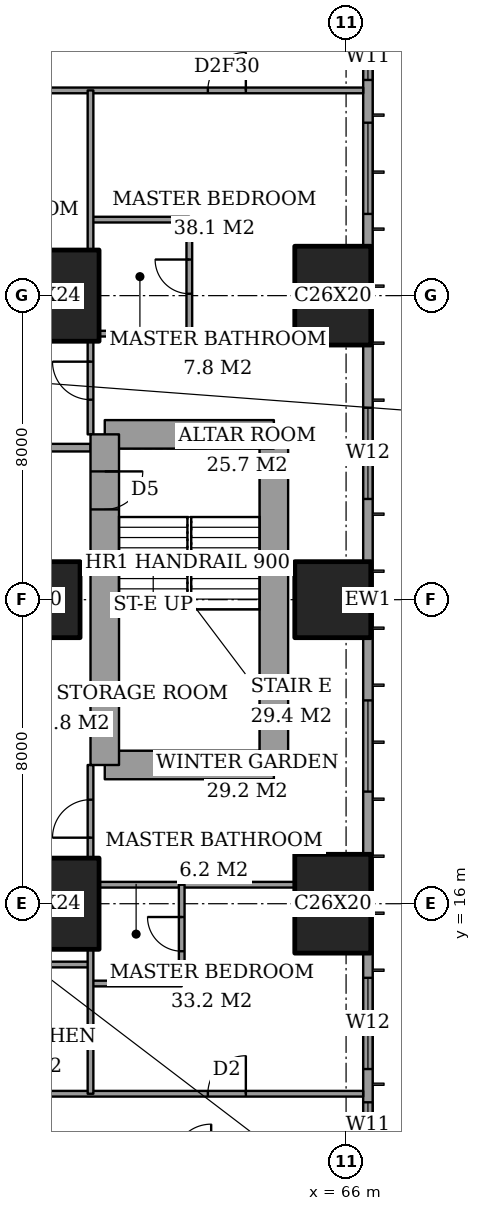
"""IFC4 building model, lengths in metres.
Left out: names, types, materials, properties, quantities, classifications, styles, units other than length and angle.
Written with IfcOpenShell. Run it as: python <this file> out.ifc"""

import sys

from ifc_helpers import new_model, si_unit, direction, frame, frame_2d, origin, origin_2d, place, context, subcontext, project, spatial, rectangle, extrude, element, fill, save


model = new_model("IFC4")
c1 = context("Model", 3, precision=1e-05, world=origin(), true_north=direction((0.0, 1.0)))
c2 = subcontext(c1, "Body", "Model", "MODEL_VIEW")
j1 = project(units=[si_unit("LENGTHUNIT", "METRE"), si_unit("PLANEANGLEUNIT", "RADIAN")], contexts=[c1])
p1 = place(None, origin())
s1 = spatial("IfcSite", under=j1, at=p1, CompositionType="ELEMENT")
p2 = place(p1, origin())
s2 = spatial("IfcBuilding", under=s1, at=p2, CompositionType="ELEMENT")
p3 = place(p2, frame((0.0, 0.0, 117.8)))
s3 = spatial("IfcBuildingStorey", under=s2, at=p3, CompositionType="ELEMENT", Elevation=117.8)
p4 = place(p3, frame((58.0, 16.0, 0.0), z_axis=(0.0, 0.0, 1.0), x_axis=(1.0, 0.0, 0.0)))
e1 = element("IfcColumn", 1, at=p4, inside=s3, PredefinedType="COLUMN", context=c2, shape_type="SweptSolid", body=[
    extrude(rectangle(XDim=3.0, YDim=2.4, at=origin_2d()), origin(), (0.0, 0.0, 1.0), 3.6),
])
p5 = place(p3, frame((58.0, 24.0, 0.0), z_axis=(0.0, 0.0, 1.0), x_axis=(1.0, 0.0, 0.0)))
e2 = element("IfcColumn", 2, at=p5, inside=s3, PredefinedType="COLUMN", context=c2, shape_type="SweptSolid", body=[
    extrude(rectangle(XDim=2.0, YDim=2.0, at=origin_2d()), origin(), (0.0, 0.0, 1.0), 3.6),
])
p6 = place(p3, frame((58.0, 32.0, 0.0), z_axis=(0.0, 0.0, 1.0), x_axis=(1.0, 0.0, 0.0)))
e3 = element("IfcColumn", 3, at=p6, inside=s3, PredefinedType="COLUMN", context=c2, shape_type="SweptSolid", body=[
    extrude(rectangle(XDim=3.0, YDim=2.4, at=origin_2d()), origin(), (0.0, 0.0, 1.0), 3.6),
])
p7 = place(p3, frame((65.65, 16.0, 0.0), z_axis=(0.0, 0.0, 1.0), x_axis=(0.0, 1.0, 0.0)))
e4 = element("IfcColumn", 4, at=p7, inside=s3, PredefinedType="COLUMN", context=c2, shape_type="SweptSolid", body=[
    extrude(rectangle(XDim=2.6, YDim=2.0, at=origin_2d()), origin(), (0.0, 0.0, 1.0), 3.6),
])
p8 = place(p3, frame((65.65, 24.0, 0.0), z_axis=(0.0, 0.0, 1.0), x_axis=(1.0, 0.0, 0.0)))
e5 = element("IfcColumn", 5, at=p8, inside=s3, PredefinedType="COLUMN", context=c2, shape_type="SweptSolid", body=[
    extrude(rectangle(XDim=2.0, YDim=2.0, at=origin_2d()), origin(), (0.0, 0.0, 1.0), 3.6),
])
p9 = place(p3, frame((65.65, 32.0, 0.0), z_axis=(0.0, 0.0, 1.0), x_axis=(0.0, 1.0, 0.0)))
e6 = element("IfcColumn", 6, at=p9, inside=s3, PredefinedType="COLUMN", context=c2, shape_type="SweptSolid", body=[
    extrude(rectangle(XDim=2.6, YDim=2.0, at=origin_2d()), origin(), (0.0, 0.0, 1.0), 3.6),
])
p10 = place(p3, frame((59.65, 19.65, 0.0), z_axis=(0.0, 0.0, 1.0), x_axis=(1.0, 0.0, 0.0)))
e7 = element("IfcWall", 7, at=p10, inside=s3, PredefinedType="SHEAR", context=c2, shape_type="SweptSolid", body=[
    extrude(rectangle(XDim=4.45, YDim=0.75, at=frame_2d((2.225, 0.0))), origin(), (0.0, 0.0, 1.0), 3.6),
])
p11 = place(p3, frame((64.1, 19.65, 0.0), z_axis=(0.0, 0.0, 1.0), x_axis=(0.0, 1.0, 0.0)))
e8 = element("IfcWall", 8, at=p11, inside=s3, PredefinedType="SHEAR", context=c2, shape_type="SweptSolid", body=[
    extrude(rectangle(XDim=8.7, YDim=0.75, at=frame_2d((4.35, 0.0))), origin(), (0.0, 0.0, 1.0), 3.6),
])
p12 = place(p3, frame((64.1, 28.35, 0.0), z_axis=(0.0, 0.0, 1.0), x_axis=(-1.0, 0.0, 0.0)))
e9 = element("IfcWall", 9, at=p12, inside=s3, PredefinedType="SHEAR", context=c2, shape_type="SweptSolid", body=[
    extrude(rectangle(XDim=4.45, YDim=0.75, at=frame_2d((2.225, 0.0))), origin(), (0.0, 0.0, 1.0), 3.6),
])
p13 = place(p3, frame((59.65, 28.35, 0.0), z_axis=(0.0, 0.0, 1.0), x_axis=(0.0, -1.0, 0.0)))
e10 = element("IfcWall", 10, at=p13, inside=s3, PredefinedType="SHEAR", context=c2, shape_type="SweptSolid", body=[
    extrude(rectangle(XDim=8.7, YDim=0.75, at=frame_2d((4.35, 0.0))), origin(), (0.0, 0.0, 1.0), 3.6),
])
p14 = place(p13, frame((0.975, 0.0, 0.0)))
e11 = element("IfcOpeningElement", 11, at=p14, cuts=e10, PredefinedType="OPENING", context=c2, shape_type="SweptSolid", body=[
    extrude(rectangle(XDim=1.0, YDim=2.1, at=frame_2d((0.5, 1.05))), frame((0.0, 0.385, 0.0), z_axis=(0.0, -1.0, 0.0), x_axis=(1.0, 0.0, 0.0)), (0.0, 0.0, 1.0), 0.77),
])
p15 = place(p3, frame((66.575, 3.175, 0.0), z_axis=(0.0, 0.0, 1.0), x_axis=(0.0, 1.0, 0.0)))
e12 = element("IfcWall", 12, at=p15, inside=s3, PredefinedType="SOLIDWALL", context=c2, shape_type="SweptSolid", body=[
    extrude(rectangle(XDim=41.65, YDim=0.25, at=frame_2d((20.825, 0.0))), origin(), (0.0, 0.0, 1.0), 3.6),
])
p16 = place(p15, frame((0.775, 0.0, 0.4)))
e13 = element("IfcOpeningElement", 13, at=p16, cuts=e12, PredefinedType="OPENING", context=c2, shape_type="SweptSolid", body=[
    extrude(rectangle(XDim=2.4, YDim=2.2, at=frame_2d((1.2, 1.1))), frame((0.0, 0.135, 0.0), z_axis=(0.0, -1.0, 0.0), x_axis=(1.0, 0.0, 0.0)), (0.0, 0.0, 1.0), 0.27),
])
p17 = place(p15, frame((6.4, 0.0, 0.4)))
e14 = element("IfcOpeningElement", 14, at=p17, cuts=e12, PredefinedType="OPENING", context=c2, shape_type="SweptSolid", body=[
    extrude(rectangle(XDim=1.2, YDim=2.2, at=frame_2d((0.6, 1.1))), frame((0.0, 0.135, 0.0), z_axis=(0.0, -1.0, 0.0), x_axis=(1.0, 0.0, 0.0)), (0.0, 0.0, 1.0), 0.27),
])
p18 = place(p15, frame((8.475, 0.0, 0.4)))
e15 = element("IfcOpeningElement", 15, at=p18, cuts=e12, PredefinedType="OPENING", context=c2, shape_type="SweptSolid", body=[
    extrude(rectangle(XDim=2.4, YDim=2.2, at=frame_2d((1.2, 1.1))), frame((0.0, 0.135, 0.0), z_axis=(0.0, -1.0, 0.0), x_axis=(1.0, 0.0, 0.0)), (0.0, 0.0, 1.0), 0.27),
])
p19 = place(p15, frame((15.775, 0.0, 0.4)))
e16 = element("IfcOpeningElement", 16, at=p19, cuts=e12, PredefinedType="OPENING", context=c2, shape_type="SweptSolid", body=[
    extrude(rectangle(XDim=2.4, YDim=2.2, at=frame_2d((1.2, 1.1))), frame((0.0, 0.135, 0.0), z_axis=(0.0, -1.0, 0.0), x_axis=(1.0, 0.0, 0.0)), (0.0, 0.0, 1.0), 0.27),
])
p20 = place(p15, frame((23.475, 0.0, 0.4)))
e17 = element("IfcOpeningElement", 17, at=p20, cuts=e12, PredefinedType="OPENING", context=c2, shape_type="SweptSolid", body=[
    extrude(rectangle(XDim=2.4, YDim=2.2, at=frame_2d((1.2, 1.1))), frame((0.0, 0.135, 0.0), z_axis=(0.0, -1.0, 0.0), x_axis=(1.0, 0.0, 0.0)), (0.0, 0.0, 1.0), 0.27),
])
p21 = place(p15, frame((30.975, 0.0, 0.4)))
e18 = element("IfcOpeningElement", 18, at=p21, cuts=e12, PredefinedType="OPENING", context=c2, shape_type="SweptSolid", body=[
    extrude(rectangle(XDim=2.4, YDim=2.2, at=frame_2d((1.2, 1.1))), frame((0.0, 0.135, 0.0), z_axis=(0.0, -1.0, 0.0), x_axis=(1.0, 0.0, 0.0)), (0.0, 0.0, 1.0), 0.27),
])
p22 = place(p15, frame((34.5, 0.0, 0.4)))
e19 = element("IfcOpeningElement", 19, at=p22, cuts=e12, PredefinedType="OPENING", context=c2, shape_type="SweptSolid", body=[
    extrude(rectangle(XDim=1.2, YDim=2.2, at=frame_2d((0.6, 1.1))), frame((0.0, 0.135, 0.0), z_axis=(0.0, -1.0, 0.0), x_axis=(1.0, 0.0, 0.0)), (0.0, 0.0, 1.0), 0.27),
])
p23 = place(p15, frame((38.475, 0.0, 0.4)))
e20 = element("IfcOpeningElement", 20, at=p23, cuts=e12, PredefinedType="OPENING", context=c2, shape_type="SweptSolid", body=[
    extrude(rectangle(XDim=2.4, YDim=2.2, at=frame_2d((1.2, 1.1))), frame((0.0, 0.135, 0.0), z_axis=(0.0, -1.0, 0.0), x_axis=(1.0, 0.0, 0.0)), (0.0, 0.0, 1.0), 0.27),
])
p24 = place(p3, frame((41.439, 11.0, 0.0), z_axis=(0.0, 0.0, 1.0), x_axis=(1.0, 0.0, 0.0)))
e21 = element("IfcWall", 21, at=p24, inside=s3, PredefinedType="PARTITIONING", context=c2, shape_type="SweptSolid", body=[
    extrude(rectangle(XDim=25.011, YDim=0.15, at=frame_2d((12.505, 0.0))), origin(), (0.0, 0.0, 1.0), 3.35),
])
p25 = place(p24, frame((12.561, 0.0, 0.0)))
e22 = element("IfcOpeningElement", 22, at=p25, cuts=e21, PredefinedType="OPENING", context=c2, shape_type="SweptSolid", body=[
    extrude(rectangle(XDim=1.0, YDim=2.1, at=frame_2d((0.5, 1.05))), frame((0.0, 0.085, 0.0), z_axis=(0.0, -1.0, 0.0), x_axis=(1.0, 0.0, 0.0)), (0.0, 0.0, 1.0), 0.17),
])
p26 = place(p24, frame((20.924, 0.0, 0.0)))
e23 = element("IfcOpeningElement", 23, at=p26, cuts=e21, PredefinedType="OPENING", context=c2, shape_type="SweptSolid", body=[
    extrude(rectangle(XDim=1.0, YDim=2.1, at=frame_2d((0.5, 1.05))), frame((0.0, 0.085, 0.0), z_axis=(0.0, -1.0, 0.0), x_axis=(1.0, 0.0, 0.0)), (0.0, 0.0, 1.0), 0.17),
])
p27 = place(p24, frame((15.499, 0.0, 0.0)))
e24 = element("IfcOpeningElement", 24, at=p27, cuts=e21, PredefinedType="OPENING", context=c2, shape_type="SweptSolid", body=[
    extrude(rectangle(XDim=1.0, YDim=2.1, at=frame_2d((0.5, 1.05))), frame((0.0, 0.085, 0.0), z_axis=(0.0, -1.0, 0.0), x_axis=(1.0, 0.0, 0.0)), (0.0, 0.0, 1.0), 0.17),
])
p28 = place(p24, frame((8.761, 0.0, 0.0)))
e25 = element("IfcOpeningElement", 25, at=p28, cuts=e21, PredefinedType="OPENING", context=c2, shape_type="SweptSolid", body=[
    extrude(rectangle(XDim=1.0, YDim=2.1, at=frame_2d((0.5, 1.05))), frame((0.0, 0.085, 0.0), z_axis=(0.0, -1.0, 0.0), x_axis=(1.0, 0.0, 0.0)), (0.0, 0.0, 1.0), 0.17),
])
p29 = place(p24, frame((2.836, 0.0, 0.0)))
e26 = element("IfcOpeningElement", 26, at=p29, cuts=e21, PredefinedType="OPENING", context=c2, shape_type="SweptSolid", body=[
    extrude(rectangle(XDim=1.0, YDim=2.1, at=frame_2d((0.5, 1.05))), frame((0.0, 0.085, 0.0), z_axis=(0.0, -1.0, 0.0), x_axis=(1.0, 0.0, 0.0)), (0.0, 0.0, 1.0), 0.17),
])
p30 = place(p3, frame((59.275, 13.9, 0.0), z_axis=(0.0, 0.0, 1.0), x_axis=(1.0, 0.0, 0.0)))
e27 = element("IfcWall", 27, at=p30, inside=s3, PredefinedType="PARTITIONING", context=c2, shape_type="SweptSolid", body=[
    extrude(rectangle(XDim=2.4, YDim=0.15, at=frame_2d((1.2, 0.0))), origin(), (0.0, 0.0, 1.0), 3.35),
])
p31 = place(p3, frame((55.6, 14.4, 0.0), z_axis=(0.0, 0.0, 1.0), x_axis=(1.0, 0.0, 0.0)))
e28 = element("IfcWall", 28, at=p31, inside=s3, PredefinedType="PARTITIONING", context=c2, shape_type="SweptSolid", body=[
    extrude(rectangle(XDim=3.675, YDim=0.15, at=frame_2d((1.837, 0.0))), origin(), (0.0, 0.0, 1.0), 3.35),
])
p32 = place(p3, frame((59.5, 16.5, 0.0), z_axis=(0.0, 0.0, 1.0), x_axis=(1.0, 0.0, 0.0)))
e29 = element("IfcWall", 29, at=p32, inside=s3, PredefinedType="PARTITIONING", context=c2, shape_type="SweptSolid", body=[
    extrude(rectangle(XDim=5.15, YDim=0.15, at=frame_2d((2.575, 0.0))), origin(), (0.0, 0.0, 1.0), 3.35),
])
p33 = place(p3, frame((42.0, 28.0, 0.0), z_axis=(0.0, 0.0, 1.0), x_axis=(1.0, 0.0, 0.0)))
e30 = element("IfcWall", 30, at=p33, inside=s3, PredefinedType="PARTITIONING", context=c2, shape_type="SweptSolid", body=[
    extrude(rectangle(XDim=17.275, YDim=0.2, at=frame_2d((8.637, 0.0))), origin(), (0.0, 0.0, 1.0), 3.35),
])
p34 = place(p33, frame((8.9, 0.0, 0.0)))
e31 = element("IfcOpeningElement", 31, at=p34, cuts=e30, PredefinedType="OPENING", context=c2, shape_type="SweptSolid", body=[
    extrude(rectangle(XDim=1.2, YDim=2.4, at=frame_2d((0.6, 1.2))), frame((0.0, 0.11, 0.0), z_axis=(0.0, -1.0, 0.0), x_axis=(1.0, 0.0, 0.0)), (0.0, 0.0, 1.0), 0.22),
])
p35 = place(p3, frame((59.5, 31.0, 0.0), z_axis=(0.0, 0.0, 1.0), x_axis=(1.0, 0.0, 0.0)))
e32 = element("IfcWall", 32, at=p35, inside=s3, PredefinedType="PARTITIONING", context=c2, shape_type="SweptSolid", body=[
    extrude(rectangle(XDim=5.15, YDim=0.15, at=frame_2d((2.575, 0.0))), origin(), (0.0, 0.0, 1.0), 3.35),
])
p36 = place(p3, frame((59.275, 34.0, 0.0), z_axis=(0.0, 0.0, 1.0), x_axis=(1.0, 0.0, 0.0)))
e33 = element("IfcWall", 33, at=p36, inside=s3, PredefinedType="PARTITIONING", context=c2, shape_type="SweptSolid", body=[
    extrude(rectangle(XDim=2.6, YDim=0.15, at=frame_2d((1.3, 0.0))), origin(), (0.0, 0.0, 1.0), 3.35),
])
p37 = place(p3, frame((41.439, 37.4, 0.0), z_axis=(0.0, 0.0, 1.0), x_axis=(1.0, 0.0, 0.0)))
e34 = element("IfcWall", 34, at=p37, inside=s3, PredefinedType="PARTITIONING", context=c2, shape_type="SweptSolid", body=[
    extrude(rectangle(XDim=25.011, YDim=0.15, at=frame_2d((12.505, 0.0))), origin(), (0.0, 0.0, 1.0), 3.35),
])
p38 = place(p37, frame((11.961, 0.0, 0.0)))
e35 = element("IfcOpeningElement", 35, at=p38, cuts=e34, PredefinedType="OPENING", context=c2, shape_type="SweptSolid", body=[
    extrude(rectangle(XDim=1.0, YDim=2.1, at=frame_2d((0.5, 1.05))), frame((0.0, 0.085, 0.0), z_axis=(0.0, -1.0, 0.0), x_axis=(1.0, 0.0, 0.0)), (0.0, 0.0, 1.0), 0.17),
])
p39 = place(p37, frame((20.924, 0.0, 0.0)))
e36 = element("IfcOpeningElement", 36, at=p39, cuts=e34, PredefinedType="OPENING", context=c2, shape_type="SweptSolid", body=[
    extrude(rectangle(XDim=1.0, YDim=2.1, at=frame_2d((0.5, 1.05))), frame((0.0, 0.085, 0.0), z_axis=(0.0, -1.0, 0.0), x_axis=(1.0, 0.0, 0.0)), (0.0, 0.0, 1.0), 0.17),
])
p40 = place(p37, frame((15.249, 0.0, 0.0)))
e37 = element("IfcOpeningElement", 37, at=p40, cuts=e34, PredefinedType="OPENING", context=c2, shape_type="SweptSolid", body=[
    extrude(rectangle(XDim=0.9, YDim=2.1, at=frame_2d((0.45, 1.05))), frame((0.0, 0.085, 0.0), z_axis=(0.0, -1.0, 0.0), x_axis=(1.0, 0.0, 0.0)), (0.0, 0.0, 1.0), 0.17),
])
p41 = place(p37, frame((9.561, 0.0, 0.0)))
e38 = element("IfcOpeningElement", 38, at=p41, cuts=e34, PredefinedType="OPENING", context=c2, shape_type="SweptSolid", body=[
    extrude(rectangle(XDim=1.0, YDim=2.1, at=frame_2d((0.5, 1.05))), frame((0.0, 0.085, 0.0), z_axis=(0.0, -1.0, 0.0), x_axis=(1.0, 0.0, 0.0)), (0.0, 0.0, 1.0), 0.17),
])
p42 = place(p37, frame((7.161, 0.0, 0.0)))
e39 = element("IfcOpeningElement", 39, at=p42, cuts=e34, PredefinedType="OPENING", context=c2, shape_type="SweptSolid", body=[
    extrude(rectangle(XDim=1.0, YDim=2.1, at=frame_2d((0.5, 1.05))), frame((0.0, 0.085, 0.0), z_axis=(0.0, -1.0, 0.0), x_axis=(1.0, 0.0, 0.0)), (0.0, 0.0, 1.0), 0.17),
])
p43 = place(p37, frame((2.836, 0.0, 0.0)))
e40 = element("IfcOpeningElement", 40, at=p43, cuts=e34, PredefinedType="OPENING", context=c2, shape_type="SweptSolid", body=[
    extrude(rectangle(XDim=1.0, YDim=2.1, at=frame_2d((0.5, 1.05))), frame((0.0, 0.085, 0.0), z_axis=(0.0, -1.0, 0.0), x_axis=(1.0, 0.0, 0.0)), (0.0, 0.0, 1.0), 0.17),
])
p44 = place(p3, frame((59.275, 11.0, 0.0), z_axis=(0.0, 0.0, 1.0), x_axis=(0.0, 1.0, 0.0)))
e41 = element("IfcWall", 41, at=p44, inside=s3, PredefinedType="PARTITIONING", context=c2, shape_type="SweptSolid", body=[
    extrude(rectangle(XDim=3.8, YDim=0.15, at=frame_2d((1.9, 0.0))), origin(), (0.0, 0.0, 1.0), 3.35),
])
p45 = place(p3, frame((59.275, 17.2, 0.0), z_axis=(0.0, 0.0, 1.0), x_axis=(0.0, 1.0, 0.0)))
e42 = element("IfcWall", 42, at=p45, inside=s3, PredefinedType="PARTITIONING", context=c2, shape_type="SweptSolid", body=[
    extrude(rectangle(XDim=2.45, YDim=0.15, at=frame_2d((1.225, 0.0))), origin(), (0.0, 0.0, 1.0), 3.35),
])
p46 = place(p45, frame((0.538, 0.0, 0.0)))
e43 = element("IfcOpeningElement", 43, at=p46, cuts=e42, PredefinedType="OPENING", context=c2, shape_type="SweptSolid", body=[
    extrude(rectangle(XDim=1.0, YDim=2.1, at=frame_2d((0.5, 1.05))), frame((0.0, 0.085, 0.0), z_axis=(0.0, -1.0, 0.0), x_axis=(1.0, 0.0, 0.0)), (0.0, 0.0, 1.0), 0.17),
])
p47 = place(p3, frame((59.275, 28.35, 0.0), z_axis=(0.0, 0.0, 1.0), x_axis=(0.0, 1.0, 0.0)))
e44 = element("IfcWall", 44, at=p47, inside=s3, PredefinedType="PARTITIONING", context=c2, shape_type="SweptSolid", body=[
    extrude(rectangle(XDim=2.45, YDim=0.15, at=frame_2d((1.225, 0.0))), origin(), (0.0, 0.0, 1.0), 3.35),
])
p48 = place(p47, frame((0.913, 0.0, 0.0)))
e45 = element("IfcOpeningElement", 45, at=p48, cuts=e44, PredefinedType="OPENING", context=c2, shape_type="SweptSolid", body=[
    extrude(rectangle(XDim=1.0, YDim=2.1, at=frame_2d((0.5, 1.05))), frame((0.0, 0.085, 0.0), z_axis=(0.0, -1.0, 0.0), x_axis=(1.0, 0.0, 0.0)), (0.0, 0.0, 1.0), 0.17),
])
p49 = place(p3, frame((59.275, 33.2, 0.0), z_axis=(0.0, 0.0, 1.0), x_axis=(0.0, 1.0, 0.0)))
e46 = element("IfcWall", 46, at=p49, inside=s3, PredefinedType="PARTITIONING", context=c2, shape_type="SweptSolid", body=[
    extrude(rectangle(XDim=4.2, YDim=0.15, at=frame_2d((2.1, 0.0))), origin(), (0.0, 0.0, 1.0), 3.35),
])
p50 = place(p3, frame((61.675, 13.9, 0.0), z_axis=(0.0, 0.0, 1.0), x_axis=(0.0, 1.0, 0.0)))
e47 = element("IfcWall", 47, at=p50, inside=s3, PredefinedType="PARTITIONING", context=c2, shape_type="SweptSolid", body=[
    extrude(rectangle(XDim=2.6, YDim=0.15, at=frame_2d((1.3, 0.0))), origin(), (0.0, 0.0, 1.0), 3.35),
])
p51 = place(p50, frame((0.85, 0.0, 0.0)))
e48 = element("IfcOpeningElement", 48, at=p51, cuts=e47, PredefinedType="OPENING", context=c2, shape_type="SweptSolid", body=[
    extrude(rectangle(XDim=0.9, YDim=2.1, at=frame_2d((0.45, 1.05))), frame((0.0, 0.085, 0.0), z_axis=(0.0, -1.0, 0.0), x_axis=(1.0, 0.0, 0.0)), (0.0, 0.0, 1.0), 0.17),
])
p52 = place(p3, frame((61.875, 31.0, 0.0), z_axis=(0.0, 0.0, 1.0), x_axis=(0.0, 1.0, 0.0)))
e49 = element("IfcWall", 49, at=p52, inside=s3, PredefinedType="PARTITIONING", context=c2, shape_type="SweptSolid", body=[
    extrude(rectangle(XDim=3.0, YDim=0.15, at=frame_2d((1.5, 0.0))), origin(), (0.0, 0.0, 1.0), 3.35),
])
p53 = place(p52, frame((1.05, 0.0, 0.0)))
e50 = element("IfcOpeningElement", 50, at=p53, cuts=e49, PredefinedType="OPENING", context=c2, shape_type="SweptSolid", body=[
    extrude(rectangle(XDim=0.9, YDim=2.1, at=frame_2d((0.45, 1.05))), frame((0.0, 0.085, 0.0), z_axis=(0.0, -1.0, 0.0), x_axis=(1.0, 0.0, 0.0)), (0.0, 0.0, 1.0), 0.17),
])
p54 = place(p17, origin())
e51 = element("IfcWindow", 51, at=p54, inside=s3, PartitioningType="SINGLE_PANEL", PredefinedType="WINDOW", context=c2, shape_type="SweptSolid", body=[
    extrude(rectangle(XDim=1.2, YDim=2.2, at=frame_2d((0.6, 1.1))), frame((0.0, 0.03, 0.0), z_axis=(0.0, -1.0, 0.0), x_axis=(1.0, 0.0, 0.0)), (0.0, 0.0, 1.0), 0.06),
])
fill(e14, e51)
p55 = place(p18, origin())
e52 = element("IfcWindow", 52, at=p55, inside=s3, PartitioningType="SINGLE_PANEL", PredefinedType="WINDOW", context=c2, shape_type="SweptSolid", body=[
    extrude(rectangle(XDim=2.4, YDim=2.2, at=frame_2d((1.2, 1.1))), frame((0.0, 0.03, 0.0), z_axis=(0.0, -1.0, 0.0), x_axis=(1.0, 0.0, 0.0)), (0.0, 0.0, 1.0), 0.06),
])
fill(e15, e52)
p56 = place(p19, origin())
e53 = element("IfcWindow", 53, at=p56, inside=s3, PartitioningType="SINGLE_PANEL", PredefinedType="WINDOW", context=c2, shape_type="SweptSolid", body=[
    extrude(rectangle(XDim=2.4, YDim=2.2, at=frame_2d((1.2, 1.1))), frame((0.0, 0.03, 0.0), z_axis=(0.0, -1.0, 0.0), x_axis=(1.0, 0.0, 0.0)), (0.0, 0.0, 1.0), 0.06),
])
fill(e16, e53)
p57 = place(p20, origin())
e54 = element("IfcWindow", 54, at=p57, inside=s3, PartitioningType="SINGLE_PANEL", PredefinedType="WINDOW", context=c2, shape_type="SweptSolid", body=[
    extrude(rectangle(XDim=2.4, YDim=2.2, at=frame_2d((1.2, 1.1))), frame((0.0, 0.03, 0.0), z_axis=(0.0, -1.0, 0.0), x_axis=(1.0, 0.0, 0.0)), (0.0, 0.0, 1.0), 0.06),
])
fill(e17, e54)
p58 = place(p21, origin())
e55 = element("IfcWindow", 55, at=p58, inside=s3, PartitioningType="SINGLE_PANEL", PredefinedType="WINDOW", context=c2, shape_type="SweptSolid", body=[
    extrude(rectangle(XDim=2.4, YDim=2.2, at=frame_2d((1.2, 1.1))), frame((0.0, 0.03, 0.0), z_axis=(0.0, -1.0, 0.0), x_axis=(1.0, 0.0, 0.0)), (0.0, 0.0, 1.0), 0.06),
])
fill(e18, e55)
p59 = place(p22, origin())
e56 = element("IfcWindow", 56, at=p59, inside=s3, PartitioningType="SINGLE_PANEL", PredefinedType="WINDOW", context=c2, shape_type="SweptSolid", body=[
    extrude(rectangle(XDim=1.2, YDim=2.2, at=frame_2d((0.6, 1.1))), frame((0.0, 0.03, 0.0), z_axis=(0.0, -1.0, 0.0), x_axis=(1.0, 0.0, 0.0)), (0.0, 0.0, 1.0), 0.06),
])
fill(e19, e56)
p60 = place(p51, origin())
e57 = element("IfcDoor", 57, at=p60, inside=s3, OperationType="SINGLE_SWING_LEFT", PredefinedType="DOOR", context=c2, shape_type="SweptSolid", body=[
    extrude(rectangle(XDim=0.9, YDim=2.1, at=frame_2d((0.45, 1.05))), frame((0.0, 0.025, 0.0), z_axis=(0.0, -1.0, 0.0), x_axis=(1.0, 0.0, 0.0)), (0.0, 0.0, 1.0), 0.05),
])
fill(e48, e57)
p61 = place(p26, origin())
e58 = element("IfcDoor", 58, at=p61, inside=s3, OperationType="SINGLE_SWING_LEFT", PredefinedType="DOOR", context=c2, shape_type="SweptSolid", body=[
    extrude(rectangle(XDim=1.0, YDim=2.1, at=frame_2d((0.5, 1.05))), frame((0.0, 0.025, 0.0), z_axis=(0.0, -1.0, 0.0), x_axis=(1.0, 0.0, 0.0)), (0.0, 0.0, 1.0), 0.05),
])
fill(e23, e58)
p62 = place(p46, origin())
e59 = element("IfcDoor", 59, at=p62, inside=s3, OperationType="SINGLE_SWING_RIGHT", PredefinedType="DOOR", context=c2, shape_type="SweptSolid", body=[
    extrude(rectangle(XDim=1.0, YDim=2.1, at=frame_2d((0.5, 1.05))), frame((0.0, 0.025, 0.0), z_axis=(0.0, -1.0, 0.0), x_axis=(1.0, 0.0, 0.0)), (0.0, 0.0, 1.0), 0.05),
])
fill(e43, e59)
p63 = place(p53, origin())
e60 = element("IfcDoor", 60, at=p63, inside=s3, OperationType="SINGLE_SWING_LEFT", PredefinedType="DOOR", context=c2, shape_type="SweptSolid", body=[
    extrude(rectangle(XDim=0.9, YDim=2.1, at=frame_2d((0.45, 1.05))), frame((0.0, 0.025, 0.0), z_axis=(0.0, -1.0, 0.0), x_axis=(1.0, 0.0, 0.0)), (0.0, 0.0, 1.0), 0.05),
])
fill(e50, e60)
p64 = place(p39, origin())
e61 = element("IfcDoor", 61, at=p64, inside=s3, OperationType="SINGLE_SWING_LEFT", PredefinedType="DOOR", context=c2, shape_type="SweptSolid", body=[
    extrude(rectangle(XDim=1.0, YDim=2.1, at=frame_2d((0.5, 1.05))), frame((0.0, 0.025, 0.0), z_axis=(0.0, -1.0, 0.0), x_axis=(1.0, 0.0, 0.0)), (0.0, 0.0, 1.0), 0.05),
])
fill(e36, e61)
p65 = place(p48, origin())
e62 = element("IfcDoor", 62, at=p65, inside=s3, OperationType="SINGLE_SWING_LEFT", PredefinedType="DOOR", context=c2, shape_type="SweptSolid", body=[
    extrude(rectangle(XDim=1.0, YDim=2.1, at=frame_2d((0.5, 1.05))), frame((0.0, 0.025, 0.0), z_axis=(0.0, -1.0, 0.0), x_axis=(1.0, 0.0, 0.0)), (0.0, 0.0, 1.0), 0.05),
])
fill(e45, e62)
p66 = place(p14, origin())
e63 = element("IfcDoor", 63, at=p66, inside=s3, OperationType="SINGLE_SWING_RIGHT", PredefinedType="DOOR", context=c2, shape_type="SweptSolid", body=[
    extrude(rectangle(XDim=1.0, YDim=2.1, at=frame_2d((0.5, 1.05))), frame((0.0, 0.025, 0.0), z_axis=(0.0, -1.0, 0.0), x_axis=(1.0, 0.0, 0.0)), (0.0, 0.0, 1.0), 0.05),
])
fill(e11, e63)
save(model, sys.argv[1])
